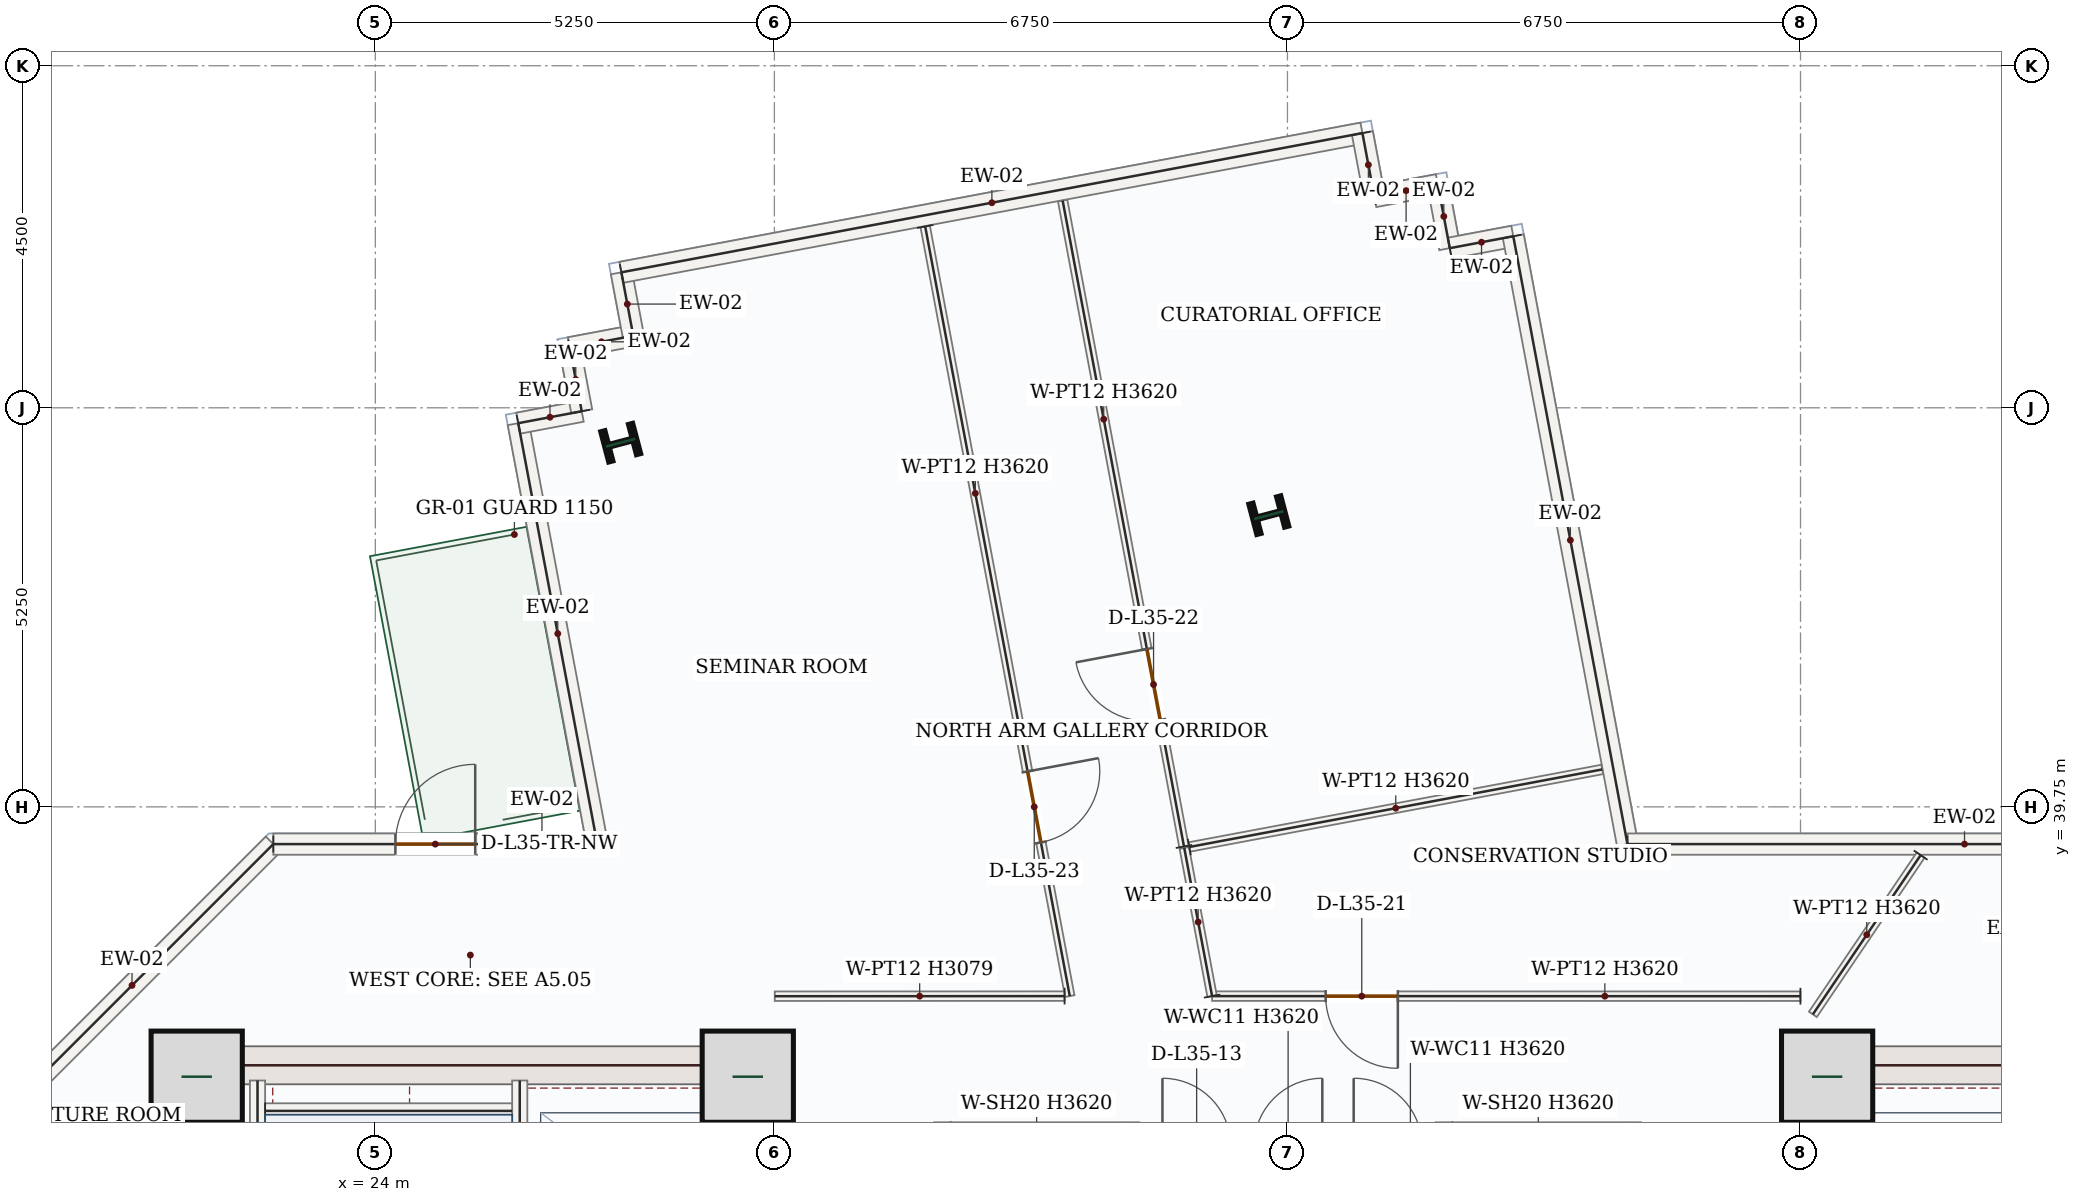
"""IFC4 building model, lengths in metres.
Left out: names, types, materials, properties, quantities, classifications, styles, units other than length and angle.
Written with IfcOpenShell. Run it as: python <this file> out.ifc"""

import sys

from ifc_helpers import new_model, si_unit, direction, frame, frame_2d, origin, origin_2d, place, context, subcontext, project, spatial, rectangle, i_section, extrude, source, transform, mapped, element, fill, save


model = new_model("IFC4")
c1 = context("Model", 3, precision=1e-05, world=origin(), true_north=direction((0.0, 1.0)))
c2 = subcontext(c1, "Body", "Model", "MODEL_VIEW")
j1 = project(units=[si_unit("LENGTHUNIT", "METRE"), si_unit("PLANEANGLEUNIT", "RADIAN")], contexts=[c1])
p1 = place(None, origin())
s1 = spatial("IfcSite", under=j1, at=p1, CompositionType="ELEMENT")
p2 = place(p1, origin())
s2 = spatial("IfcBuilding", under=s1, at=p2, CompositionType="ELEMENT")
p3 = place(p2, frame((0.0, 0.0, 155.1)))
s3 = spatial("IfcBuildingStorey", under=s2, at=p3, CompositionType="ELEMENT", Elevation=155.1)
m1 = source(origin(), c2, "Body", "SweptSolid", [
    extrude(rectangle(XDim=8.55, YDim=0.5, at=frame_2d((4.275, 0.0))), origin(), (0.0, 0.0, 1.0), 3.62),
])
p4 = place(p3, frame((21.5, 28.05, 0.0), z_axis=(0.0, 0.0, 1.0), x_axis=(0.0, 1.0, 0.0)))
e1 = element("IfcWall", 1, at=p4, inside=s3, PredefinedType="SHEAR", context=c2, shape_type="MappedRepresentation", body=[
    mapped(m1, transform((0.0, 0.0, 0.0), x_axis=(1.0, 0.0, 0.0), y_axis=(0.0, 1.0, 0.0), z_axis=(0.0, 0.0, 1.0), scale=1.0)),
])
p5 = place(p3, frame((29.0, 28.05, 0.0), z_axis=(0.0, 0.0, 1.0), x_axis=(0.0, 1.0, 0.0)))
e2 = element("IfcWall", 2, at=p5, inside=s3, PredefinedType="SHEAR", context=c2, shape_type="SweptSolid", body=[
    extrude(rectangle(XDim=8.55, YDim=0.5, at=frame_2d((4.275, 0.0))), origin(), (0.0, 0.0, 1.0), 3.62),
])
p6 = place(p5, frame((1.5, 0.0, 0.0)))
e3 = element("IfcOpeningElement", 3, at=p6, cuts=e2, PredefinedType="OPENING", context=c2, shape_type="SweptSolid", body=[
    extrude(rectangle(XDim=1.1, YDim=2.2, at=frame_2d((0.55, 1.1))), frame((0.0, 0.26, 0.0), z_axis=(0.0, -1.0, 0.0), x_axis=(1.0, 0.0, 0.0)), (0.0, 0.0, 1.0), 0.52),
])
m2 = source(origin(), c2, "Body", "SweptSolid", [
    extrude(rectangle(XDim=7.0, YDim=0.5, at=frame_2d((3.5, 0.0))), origin(), (0.0, 0.0, 1.0), 3.62),
])
p7 = place(p3, frame((21.75, 36.35, 0.0), z_axis=(0.0, 0.0, 1.0), x_axis=(1.0, 0.0, 0.0)))
e4 = element("IfcWall", 4, at=p7, inside=s3, PredefinedType="SHEAR", context=c2, shape_type="MappedRepresentation", body=[
    mapped(m2, transform((0.0, 0.0, 0.0), x_axis=(1.0, 0.0, 0.0), y_axis=(0.0, 1.0, 0.0), z_axis=(0.0, 0.0, 1.0), scale=1.0)),
])
p8 = place(p3, frame((43.0, 28.05, 0.0), z_axis=(0.0, 0.0, 1.0), x_axis=(0.0, 1.0, 0.0)))
e5 = element("IfcWall", 5, at=p8, inside=s3, PredefinedType="SHEAR", context=c2, shape_type="SweptSolid", body=[
    extrude(rectangle(XDim=8.55, YDim=0.5, at=frame_2d((4.275, 0.0))), origin(), (0.0, 0.0, 1.0), 3.62),
])
p9 = place(p8, frame((1.5, 0.0, 0.0)))
e6 = element("IfcOpeningElement", 6, at=p9, cuts=e5, PredefinedType="OPENING", context=c2, shape_type="SweptSolid", body=[
    extrude(rectangle(XDim=1.1, YDim=2.2, at=frame_2d((0.55, 1.1))), frame((0.0, 0.26, 0.0), z_axis=(0.0, -1.0, 0.0), x_axis=(1.0, 0.0, 0.0)), (0.0, 0.0, 1.0), 0.52),
])
p10 = place(p3, frame((43.25, 36.35, 0.0), z_axis=(0.0, 0.0, 1.0), x_axis=(1.0, 0.0, 0.0)))
e7 = element("IfcWall", 7, at=p10, inside=s3, PredefinedType="SHEAR", context=c2, shape_type="MappedRepresentation", body=[
    mapped(m2, transform((0.0, 0.0, 0.0), x_axis=(1.0, 0.0, 0.0), y_axis=(0.0, 1.0, 0.0), z_axis=(0.0, 0.0, 1.0), scale=1.0)),
])
m3 = source(origin(), c2, "Body", "SweptSolid", [
    extrude(rectangle(XDim=1.2, YDim=1.2, at=origin_2d()), origin(), (0.0, 0.0, 1.0), 3.9),
])
for number, where, z_axis, x_axis in (
    (8, (21.65, 36.2, 0.0), (0.0, 0.0, 1.0), (1.0, 0.0, 0.0)),
    (9, (28.9, 36.2, 0.0), (0.0, 0.0, 1.0), (1.0, 0.0, 0.0)),
    (10, (43.1, 36.2, 0.0), (0.0, 0.0, 1.0), (1.0, 0.0, 0.0)),
):
    element("IfcColumn", number, at=place(p3, frame(where, z_axis=z_axis, x_axis=x_axis)), inside=s3, PredefinedType="COLUMN", context=c2, shape_type="MappedRepresentation", body=[
        mapped(m3, transform((0.0, 0.0, 0.0), x_axis=(1.0, 0.0, 0.0), y_axis=(0.0, 1.0, 0.0), z_axis=(0.0, 0.0, 1.0), scale=1.0)),
    ])
m4 = source(origin(), c2, "Body", "SweptSolid", [
    extrude(i_section(OverallWidth=0.412, OverallDepth=0.435, WebThickness=0.036, FlangeThickness=0.057, FilletRadius=0.018, at=origin_2d()), origin(), (0.0, 0.0, 1.0), 3.9),
])
for number, where, z_axis, x_axis in (
    (11, (35.755, 43.588, 0.0), (0.0, 0.0, 1.0), (-0.255, 0.967, 0.0)),
    (12, (27.228, 44.541, 0.0), (0.0, 0.0, 1.0), (-0.255, 0.967, 0.0)),
):
    element("IfcColumn", number, at=place(p3, frame(where, z_axis=z_axis, x_axis=x_axis)), inside=s3, PredefinedType="COLUMN", context=c2, shape_type="MappedRepresentation", body=[
        mapped(m4, transform((0.0, 0.0, 0.0), x_axis=(1.0, 0.0, 0.0), y_axis=(0.0, 1.0, 0.0), z_axis=(0.0, 0.0, 1.0), scale=1.0)),
    ])
m5 = source(origin(), c2, "Body", "SweptSolid", [
    extrude(rectangle(XDim=5.258, YDim=0.28, at=frame_2d((2.629, 0.0))), origin(), (0.0, 0.0, 1.0), 3.62),
])
p11 = place(p3, frame((18.94, 35.542, 0.0), z_axis=(0.0, 0.0, 1.0), x_axis=(0.707106781187, 0.707106781187, 0.0)))
e13 = element("IfcWall", 13, at=p11, inside=s3, PredefinedType="SOLIDWALL", context=c2, shape_type="MappedRepresentation", body=[
    mapped(m5, transform((0.0, 0.0, 0.0), x_axis=(1.0, 0.0, 0.0), y_axis=(0.0, 1.0, 0.0), z_axis=(0.0, 0.0, 1.0), scale=1.0)),
])
p12 = place(p3, frame((22.658, 39.26, 0.0), z_axis=(0.0, 0.0, 1.0), x_axis=(1.0, 0.0, 0.0)))
e14 = element("IfcWall", 14, at=p12, inside=s3, PredefinedType="SOLIDWALL", context=c2, shape_type="SweptSolid", body=[
    extrude(rectangle(XDim=4.262, YDim=0.28, at=frame_2d((2.131, 0.0))), origin(), (0.0, 0.0, 1.0), 3.62),
])
p13 = place(p12, frame((1.606, 0.0, 0.0)))
e15 = element("IfcOpeningElement", 15, at=p13, cuts=e14, PredefinedType="OPENING", context=c2, shape_type="SweptSolid", body=[
    extrude(rectangle(XDim=1.05, YDim=2.15, at=frame_2d((0.525, 1.075))), frame((0.0, 0.15, 0.0), z_axis=(0.0, -1.0, 0.0), x_axis=(1.0, 0.0, 0.0)), (0.0, 0.0, 1.0), 0.3),
])
m6 = source(origin(), c2, "Body", "SweptSolid", [
    extrude(rectangle(XDim=5.634, YDim=0.28, at=frame_2d((2.817, 0.0))), origin(), (0.0, 0.0, 1.0), 3.62),
])
p14 = place(p3, frame((26.92, 39.26, 0.0), z_axis=(0.0, 0.0, 1.0), x_axis=(-0.184678339457, 0.982799018587, 0.0)))
e16 = element("IfcWall", 16, at=p14, inside=s3, PredefinedType="SOLIDWALL", context=c2, shape_type="MappedRepresentation", body=[
    mapped(m6, transform((0.0, 0.0, 0.0), x_axis=(1.0, 0.0, 0.0), y_axis=(0.0, 1.0, 0.0), z_axis=(0.0, 0.0, 1.0), scale=1.0)),
])
m7 = source(origin(), c2, "Body", "SweptSolid", [
    extrude(rectangle(XDim=0.85, YDim=0.28, at=frame_2d((0.425, 0.0))), origin(), (0.0, 0.0, 1.0), 3.62),
])
for number, where, z_axis, x_axis in (
    (17, (25.88, 44.797, 0.0), (0.0, 0.0, 1.0), (0.983, 0.185, 0.0)),
    (18, (26.715, 44.954, 0.0), (0.0, 0.0, 1.0), (-0.185, 0.983, 0.0)),
    (19, (26.558, 45.79, 0.0), (0.0, 0.0, 1.0), (0.983, 0.185, 0.0)),
    (20, (27.394, 45.947, 0.0), (0.0, 0.0, 1.0), (-0.185, 0.983, 0.0)),
):
    element("IfcWall", number, at=place(p3, frame(where, z_axis=z_axis, x_axis=x_axis)), inside=s3, PredefinedType="SOLIDWALL", context=c2, shape_type="MappedRepresentation", body=[
        mapped(m7, transform((0.0, 0.0, 0.0), x_axis=(1.0, 0.0, 0.0), y_axis=(0.0, 1.0, 0.0), z_axis=(0.0, 0.0, 1.0), scale=1.0)),
    ])
m8 = source(origin(), c2, "Body", "SweptSolid", [
    extrude(rectangle(XDim=9.92, YDim=0.28, at=frame_2d((4.96, 0.0))), origin(), (0.0, 0.0, 1.0), 3.62),
])
p15 = place(p3, frame((27.237, 46.782, 0.0), z_axis=(0.0, 0.0, 1.0), x_axis=(0.982807207568, 0.184634754994, 0.0)))
e21 = element("IfcWall", 21, at=p15, inside=s3, PredefinedType="SOLIDWALL", context=c2, shape_type="MappedRepresentation", body=[
    mapped(m8, transform((0.0, 0.0, 0.0), x_axis=(1.0, 0.0, 0.0), y_axis=(0.0, 1.0, 0.0), z_axis=(0.0, 0.0, 1.0), scale=1.0)),
])
for number, where, z_axis, x_axis in (
    (22, (36.986, 48.614, 0.0), (0.0, 0.0, 1.0), (0.185, -0.983, 0.0)),
    (23, (37.143, 47.778, 0.0), (0.0, 0.0, 1.0), (0.983, 0.185, 0.0)),
    (24, (37.979, 47.935, 0.0), (0.0, 0.0, 1.0), (0.185, -0.983, 0.0)),
    (25, (38.135, 47.1, 0.0), (0.0, 0.0, 1.0), (0.983, 0.185, 0.0)),
):
    element("IfcWall", number, at=place(p3, frame(where, z_axis=z_axis, x_axis=x_axis)), inside=s3, PredefinedType="SOLIDWALL", context=c2, shape_type="MappedRepresentation", body=[
        mapped(m7, transform((0.0, 0.0, 0.0), x_axis=(1.0, 0.0, 0.0), y_axis=(0.0, 1.0, 0.0), z_axis=(0.0, 0.0, 1.0), scale=1.0)),
    ])
m9 = source(origin(), c2, "Body", "SweptSolid", [
    extrude(rectangle(XDim=8.137, YDim=0.28, at=frame_2d((4.068, 0.0))), origin(), (0.0, 0.0, 1.0), 3.62),
])
p16 = place(p3, frame((38.971, 47.257, 0.0), z_axis=(0.0, 0.0, 1.0), x_axis=(0.184649032166, -0.982804525285, 0.0)))
e26 = element("IfcWall", 26, at=p16, inside=s3, PredefinedType="SOLIDWALL", context=c2, shape_type="MappedRepresentation", body=[
    mapped(m9, transform((0.0, 0.0, 0.0), x_axis=(1.0, 0.0, 0.0), y_axis=(0.0, 1.0, 0.0), z_axis=(0.0, 0.0, 1.0), scale=1.0)),
])
m10 = source(origin(), c2, "Body", "SweptSolid", [
    extrude(rectangle(XDim=8.869, YDim=0.28, at=frame_2d((4.434, 0.0))), origin(), (0.0, 0.0, 1.0), 3.62),
])
p17 = place(p3, frame((40.473, 39.26, 0.0), z_axis=(0.0, 0.0, 1.0), x_axis=(1.0, 0.0, 0.0)))
e27 = element("IfcWall", 27, at=p17, inside=s3, PredefinedType="SOLIDWALL", context=c2, shape_type="MappedRepresentation", body=[
    mapped(m10, transform((0.0, 0.0, 0.0), x_axis=(1.0, 0.0, 0.0), y_axis=(0.0, 1.0, 0.0), z_axis=(0.0, 0.0, 1.0), scale=1.0)),
])
m11 = source(origin(), c2, "Body", "SweptSolid", [
    extrude(rectangle(XDim=7.87, YDim=0.2, at=frame_2d((3.935, 0.0))), origin(), (0.0, 0.0, 1.0), 3.62),
])
p18 = place(p3, frame((22.45, 28.28, 0.0), z_axis=(0.0, 0.0, 1.0), x_axis=(0.0, 1.0, 0.0)))
e28 = element("IfcWall", 28, at=p18, inside=s3, PredefinedType="SOLIDWALL", context=c2, shape_type="MappedRepresentation", body=[
    mapped(m11, transform((0.0, 0.0, 0.0), x_axis=(1.0, 0.0, 0.0), y_axis=(0.0, 1.0, 0.0), z_axis=(0.0, 0.0, 1.0), scale=1.0)),
])
p19 = place(p3, frame((25.9, 28.15, 0.0), z_axis=(0.0, 0.0, 1.0), x_axis=(0.0, 1.0, 0.0)))
e29 = element("IfcWall", 29, at=p19, inside=s3, PredefinedType="SOLIDWALL", context=c2, shape_type="SweptSolid", body=[
    extrude(rectangle(XDim=8.0, YDim=0.2, at=frame_2d((4.0, 0.0))), origin(), (0.0, 0.0, 1.0), 3.62),
])
p20 = place(p19, frame((0.4, 0.0, 0.0)))
e30 = element("IfcOpeningElement", 30, at=p20, cuts=e29, PredefinedType="OPENING", context=c2, shape_type="SweptSolid", body=[
    extrude(rectangle(XDim=1.05, YDim=2.15, at=frame_2d((0.525, 1.075))), frame((0.0, 0.11, 0.0), z_axis=(0.0, -1.0, 0.0), x_axis=(1.0, 0.0, 0.0)), (0.0, 0.0, 1.0), 0.22),
])
m12 = source(origin(), c2, "Body", "SweptSolid", [
    extrude(rectangle(XDim=3.25, YDim=0.2, at=frame_2d((1.625, 0.0))), origin(), (0.0, 0.0, 1.0), 3.62),
])
p21 = place(p3, frame((22.55, 35.75, 0.0), z_axis=(0.0, 0.0, 1.0), x_axis=(1.0, 0.0, 0.0)))
e31 = element("IfcWall", 31, at=p21, inside=s3, PredefinedType="SOLIDWALL", context=c2, shape_type="MappedRepresentation", body=[
    mapped(m12, transform((0.0, 0.0, 0.0), x_axis=(1.0, 0.0, 0.0), y_axis=(0.0, 1.0, 0.0), z_axis=(0.0, 0.0, 1.0), scale=1.0)),
])
m13 = source(origin(), c2, "Body", "SweptSolid", [
    extrude(rectangle(XDim=2.4, YDim=0.2, at=frame_2d((1.2, 0.0))), origin(), (0.0, 0.0, 1.0), 3.62),
])
for number, where, z_axis, x_axis in (
    (32, (31.45, 33.2, 0.0), (0.0, 0.0, 1.0), (0.0, 1.0, 0.0)),
    (33, (33.95, 33.2, 0.0), (0.0, 0.0, 1.0), (0.0, 1.0, 0.0)),
    (34, (38.05, 33.2, 0.0), (0.0, 0.0, 1.0), (0.0, 1.0, 0.0)),
    (35, (40.55, 33.2, 0.0), (0.0, 0.0, 1.0), (0.0, 1.0, 0.0)),
):
    element("IfcWall", number, at=place(p3, frame(where, z_axis=z_axis, x_axis=x_axis)), inside=s3, PredefinedType="SOLIDWALL", context=c2, shape_type="MappedRepresentation", body=[
        mapped(m13, transform((0.0, 0.0, 0.0), x_axis=(1.0, 0.0, 0.0), y_axis=(0.0, 1.0, 0.0), z_axis=(0.0, 0.0, 1.0), scale=1.0)),
    ])
p22 = place(p3, frame((42.749, 37.259, 0.0), z_axis=(0.0, 0.0, 1.0), x_axis=(-0.999999992041, 0.000126163065, 0.0)))
e36 = element("IfcWall", 36, at=p22, inside=s3, PredefinedType="PARTITIONING", context=c2, shape_type="SweptSolid", body=[
    extrude(rectangle(XDim=7.74, YDim=0.125, at=frame_2d((3.87, 0.0))), origin(), (0.0, 0.0, 1.0), 3.62),
])
p23 = place(p22, frame((5.296, 0.0, 0.0)))
e37 = element("IfcOpeningElement", 37, at=p23, cuts=e36, PredefinedType="OPENING", context=c2, shape_type="SweptSolid", body=[
    extrude(rectangle(XDim=0.95, YDim=2.15, at=frame_2d((0.475, 1.075))), frame((0.0, 0.073, 0.0), z_axis=(0.0, -1.0, 0.0), x_axis=(1.0, 0.0, 0.0)), (0.0, 0.0, 1.0), 0.145),
])
m14 = source(origin(), c2, "Body", "SweptSolid", [
    extrude(rectangle(XDim=1.983, YDim=0.125, at=frame_2d((0.992, 0.0))), origin(), (0.0, 0.0, 1.0), 3.62),
])
p24 = place(p3, frame((35.009, 37.26, 0.0), z_axis=(0.0, 0.0, 1.0), x_axis=(-0.184645271511, 0.982805231828, 0.0)))
e38 = element("IfcWall", 38, at=p24, inside=s3, PredefinedType="PARTITIONING", context=c2, shape_type="MappedRepresentation", body=[
    mapped(m14, transform((0.0, 0.0, 0.0), x_axis=(1.0, 0.0, 0.0), y_axis=(0.0, 1.0, 0.0), z_axis=(0.0, 0.0, 1.0), scale=1.0)),
])
m15 = source(origin(), c2, "Body", "SweptSolid", [
    extrude(rectangle(XDim=5.527, YDim=0.125, at=frame_2d((2.764, 0.0))), origin(), (0.0, 0.0, 1.0), 3.62),
])
p25 = place(p3, frame((34.709, 39.222, 0.0), z_axis=(0.0, 0.0, 1.0), x_axis=(0.982808624954, 0.184627210117, 0.0)))
e39 = element("IfcWall", 39, at=p25, inside=s3, PredefinedType="PARTITIONING", context=c2, shape_type="MappedRepresentation", body=[
    mapped(m15, transform((0.0, 0.0, 0.0), x_axis=(1.0, 0.0, 0.0), y_axis=(0.0, 1.0, 0.0), z_axis=(0.0, 0.0, 1.0), scale=1.0)),
])
m16 = source(origin(), c2, "Body", "SweptSolid", [
    extrude(rectangle(XDim=2.53, YDim=0.125, at=frame_2d((1.265, 0.0))), origin(), (0.0, 0.0, 1.0), 3.62),
])
p26 = place(p3, frame((44.33, 39.115, 0.0), z_axis=(0.0, 0.0, 1.0), x_axis=(-0.560455418396, -0.82818459536, 0.0)))
e40 = element("IfcWall", 40, at=p26, inside=s3, PredefinedType="PARTITIONING", context=c2, shape_type="MappedRepresentation", body=[
    mapped(m16, transform((0.0, 0.0, 0.0), x_axis=(1.0, 0.0, 0.0), y_axis=(0.0, 1.0, 0.0), z_axis=(0.0, 0.0, 1.0), scale=1.0)),
])
p27 = place(p3, frame((34.639, 39.229, 0.0), z_axis=(0.0, 0.0, 1.0), x_axis=(-0.18463806937, 0.982806584908, 0.0)))
e41 = element("IfcWall", 41, at=p27, inside=s3, PredefinedType="PARTITIONING", context=c2, shape_type="SweptSolid", body=[
    extrude(rectangle(XDim=8.645, YDim=0.125, at=frame_2d((4.323, 0.0))), origin(), (0.0, 0.0, 1.0), 3.62),
])
p28 = place(p27, frame((1.693, 0.0, 0.0)))
e42 = element("IfcOpeningElement", 42, at=p28, cuts=e41, PredefinedType="OPENING", context=c2, shape_type="SweptSolid", body=[
    extrude(rectangle(XDim=0.95, YDim=2.15, at=frame_2d((0.475, 1.075))), frame((0.0, 0.073, 0.0), z_axis=(0.0, -1.0, 0.0), x_axis=(1.0, 0.0, 0.0)), (0.0, 0.0, 1.0), 0.145),
])
p29 = place(p3, frame((31.234, 47.385, 0.0), z_axis=(0.0, 0.0, 1.0), x_axis=(0.184646211839, -0.982805055163, 0.0)))
e43 = element("IfcWall", 43, at=p29, inside=s3, PredefinedType="PARTITIONING", context=c2, shape_type="SweptSolid", body=[
    extrude(rectangle(XDim=10.303, YDim=0.125, at=frame_2d((5.151, 0.0))), origin(), (0.0, 0.0, 1.0), 3.62),
])
p30 = place(p29, frame((7.295, 0.0, 0.0)))
e44 = element("IfcOpeningElement", 44, at=p30, cuts=e43, PredefinedType="OPENING", context=c2, shape_type="SweptSolid", body=[
    extrude(rectangle(XDim=0.95, YDim=2.15, at=frame_2d((0.475, 1.075))), frame((0.0, 0.073, 0.0), z_axis=(0.0, -1.0, 0.0), x_axis=(1.0, 0.0, 0.0)), (0.0, 0.0, 1.0), 0.145),
])
m17 = source(origin(), c2, "Body", "SweptSolid", [
    extrude(rectangle(XDim=3.813, YDim=0.125, at=frame_2d((1.906, 0.0))), origin(), (0.0, 0.0, 1.0), 3.079),
])
p31 = place(p3, frame((33.068, 37.26, 0.0), z_axis=(0.0, 0.0, 1.0), x_axis=(-0.999999948748, -0.000320163908, 0.0)))
e45 = element("IfcWall", 45, at=p31, inside=s3, PredefinedType="PARTITIONING", context=c2, shape_type="MappedRepresentation", body=[
    mapped(m17, transform((0.0, 0.0, 0.0), x_axis=(1.0, 0.0, 0.0), y_axis=(0.0, 1.0, 0.0), z_axis=(0.0, 0.0, 1.0), scale=1.0)),
])
m18 = source(origin(), c2, "Body", "SweptSolid", [
    extrude(rectangle(XDim=1.05, YDim=2.15, at=frame_2d((0.525, 1.075))), frame((0.0, 0.025, 0.0), z_axis=(0.0, -1.0, 0.0), x_axis=(1.0, 0.0, 0.0)), (0.0, 0.0, 1.0), 0.05),
])
p32 = place(p13, origin())
e46 = element("IfcDoor", 46, at=p32, inside=s3, OperationType="SINGLE_SWING_RIGHT", PredefinedType="DOOR", context=c2, shape_type="MappedRepresentation", body=[
    mapped(m18, transform((0.0, 0.0, 0.0), x_axis=(1.0, 0.0, 0.0), y_axis=(0.0, 1.0, 0.0), z_axis=(0.0, 0.0, 1.0), scale=1.0)),
])
fill(e15, e46)
m19 = source(origin(), c2, "Body", "SweptSolid", [
    extrude(rectangle(XDim=0.95, YDim=2.15, at=frame_2d((0.475, 1.075))), frame((0.0, 0.025, 0.0), z_axis=(0.0, -1.0, 0.0), x_axis=(1.0, 0.0, 0.0)), (0.0, 0.0, 1.0), 0.05),
])
p33 = place(p23, origin())
e47 = element("IfcDoor", 47, at=p33, inside=s3, OperationType="SINGLE_SWING_LEFT", PredefinedType="DOOR", context=c2, shape_type="MappedRepresentation", body=[
    mapped(m19, transform((0.0, 0.0, 0.0), x_axis=(1.0, 0.0, 0.0), y_axis=(0.0, 1.0, 0.0), z_axis=(0.0, 0.0, 1.0), scale=1.0)),
])
fill(e37, e47)
p34 = place(p28, origin())
e48 = element("IfcDoor", 48, at=p34, inside=s3, OperationType="SINGLE_SWING_RIGHT", PredefinedType="DOOR", context=c2, shape_type="MappedRepresentation", body=[
    mapped(m19, transform((0.0, 0.0, 0.0), x_axis=(1.0, 0.0, 0.0), y_axis=(0.0, 1.0, 0.0), z_axis=(0.0, 0.0, 1.0), scale=1.0)),
])
fill(e42, e48)
p35 = place(p30, origin())
e49 = element("IfcDoor", 49, at=p35, inside=s3, OperationType="SINGLE_SWING_LEFT", PredefinedType="DOOR", context=c2, shape_type="MappedRepresentation", body=[
    mapped(m19, transform((0.0, 0.0, 0.0), x_axis=(1.0, 0.0, 0.0), y_axis=(0.0, 1.0, 0.0), z_axis=(0.0, 0.0, 1.0), scale=1.0)),
])
fill(e44, e49)
save(model, sys.argv[1])
